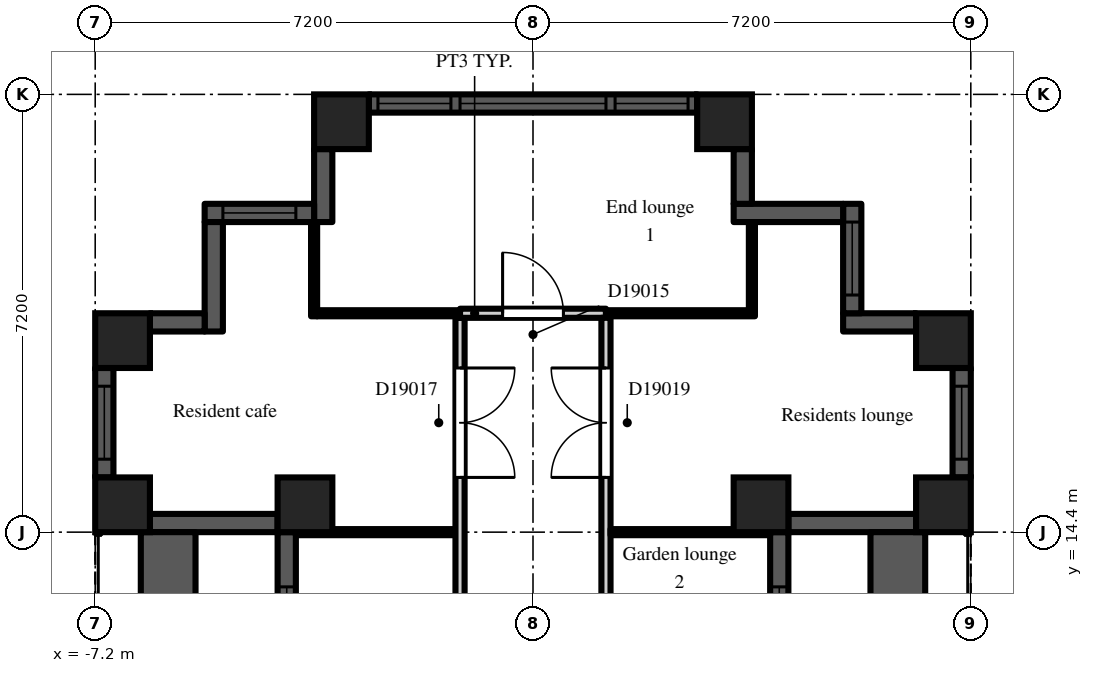
"""IFC4 building model, lengths in metres.
Left out: names, types, materials, properties, quantities, classifications, styles, units other than length and angle.
Written with IfcOpenShell. Run it as: python <this file> out.ifc"""

import sys

from ifc_helpers import new_model, si_unit, direction, frame, frame_2d, origin, origin_2d, place, context, subcontext, project, spatial, rectangle, extrude, element, fill, save


model = new_model("IFC4")
c1 = context("Model", 3, precision=1e-05, world=origin(), true_north=direction((0.0, 1.0)))
c2 = subcontext(c1, "Body", "Model", "MODEL_VIEW")
j1 = project(units=[si_unit("LENGTHUNIT", "METRE"), si_unit("PLANEANGLEUNIT", "RADIAN")], contexts=[c1])
p1 = place(None, origin())
s1 = spatial("IfcSite", under=j1, at=p1, CompositionType="ELEMENT")
p2 = place(p1, origin())
s2 = spatial("IfcBuilding", under=s1, at=p2, CompositionType="ELEMENT")
p3 = place(p2, frame((0.0, 0.0, 129.3)))
s3 = spatial("IfcBuildingStorey", under=s2, at=p3, CompositionType="ELEMENT", Elevation=129.3)
for number, where, z_axis, x_axis in (
    (1, (-6.75, 14.85, 0.0), (0.0, 0.0, 1.0), (1.0, 0.0, 0.0)),
    (2, (-6.75, 17.55, 0.0), (0.0, 0.0, 1.0), (1.0, 0.0, 0.0)),
    (3, (-3.75, 14.85, 0.0), (0.0, 0.0, 1.0), (1.0, 0.0, 0.0)),
    (4, (-3.15, 21.15, 0.0), (0.0, 0.0, 1.0), (1.0, 0.0, 0.0)),
    (5, (3.15, 21.15, 0.0), (0.0, 0.0, 1.0), (1.0, 0.0, 0.0)),
    (6, (3.75, 14.85, 0.0), (0.0, 0.0, 1.0), (1.0, 0.0, 0.0)),
    (7, (6.75, 14.85, 0.0), (0.0, 0.0, 1.0), (1.0, 0.0, 0.0)),
    (8, (6.75, 17.55, 0.0), (0.0, 0.0, 1.0), (1.0, 0.0, 0.0)),
):
    element("IfcColumn", number, at=place(p3, frame(where, z_axis=z_axis, x_axis=x_axis)), inside=s3, PredefinedType="COLUMN", context=c2, shape_type="SweptSolid", body=[
        extrude(rectangle(XDim=0.9, YDim=0.9, at=origin_2d()), origin(), (0.0, 0.0, 1.0), 3.0),
    ])
p4 = place(p3, frame((4.05, 7.2, 0.0), z_axis=(0.0, 0.0, 1.0), x_axis=(0.0, 1.0, 0.0)))
e9 = element("IfcWall", 9, at=p4, inside=s3, PredefinedType="SOLIDWALL", context=c2, shape_type="SweptSolid", body=[
    extrude(rectangle(XDim=7.2, YDim=0.3, at=frame_2d((3.6, 0.0))), origin(), (0.0, 0.0, 1.0), 2.2),
])
p5 = place(p4, frame((3.0, 0.0, 0.0)))
e10 = element("IfcOpeningElement", 10, at=p5, cuts=e9, PredefinedType="OPENING", context=c2, shape_type="SweptSolid", body=[
    extrude(rectangle(XDim=1.2, YDim=2.05, at=frame_2d((0.6, 1.025))), frame((0.0, 0.16, 0.0), z_axis=(0.0, -1.0, 0.0), x_axis=(1.0, 0.0, 0.0)), (0.0, 0.0, 1.0), 0.32),
])
p6 = place(p4, frame((0.9, 0.0, 0.2)))
e11 = element("IfcOpeningElement", 11, at=p6, cuts=e9, PredefinedType="OPENING", context=c2, shape_type="SweptSolid", body=[
    extrude(rectangle(XDim=1.8, YDim=1.85, at=frame_2d((0.9, 0.925))), frame((0.0, 0.16, 0.0), z_axis=(0.0, -1.0, 0.0), x_axis=(1.0, 0.0, 0.0)), (0.0, 0.0, 1.0), 0.32),
])
p7 = place(p4, frame((4.5, 0.0, 0.2)))
e12 = element("IfcOpeningElement", 12, at=p7, cuts=e9, PredefinedType="OPENING", context=c2, shape_type="SweptSolid", body=[
    extrude(rectangle(XDim=1.8, YDim=1.85, at=frame_2d((0.9, 0.925))), frame((0.0, 0.16, 0.0), z_axis=(0.0, -1.0, 0.0), x_axis=(1.0, 0.0, 0.0)), (0.0, 0.0, 1.0), 0.32),
])
p8 = place(p3, frame((4.2, 14.55, 0.0), z_axis=(0.0, 0.0, 1.0), x_axis=(1.0, 0.0, 0.0)))
e13 = element("IfcWall", 13, at=p8, inside=s3, PredefinedType="SOLIDWALL", context=c2, shape_type="SweptSolid", body=[
    extrude(rectangle(XDim=2.1, YDim=0.3, at=frame_2d((1.05, 0.0))), origin(), (0.0, 0.0, 1.0), 2.2),
])
p9 = place(p3, frame((7.05, 15.3, 0.0), z_axis=(0.0, 0.0, 1.0), x_axis=(0.0, 1.0, 0.0)))
e14 = element("IfcWall", 14, at=p9, inside=s3, PredefinedType="SOLIDWALL", context=c2, shape_type="SweptSolid", body=[
    extrude(rectangle(XDim=1.8, YDim=0.3, at=frame_2d((0.9, 0.0))), origin(), (0.0, 0.0, 1.0), 2.2),
])
p10 = place(p9, frame((0.3, 0.0, 0.2)))
e15 = element("IfcOpeningElement", 15, at=p10, cuts=e14, PredefinedType="OPENING", context=c2, shape_type="SweptSolid", body=[
    extrude(rectangle(XDim=1.2, YDim=1.85, at=frame_2d((0.6, 0.925))), frame((0.0, 0.16, 0.0), z_axis=(0.0, -1.0, 0.0), x_axis=(1.0, 0.0, 0.0)), (0.0, 0.0, 1.0), 0.32),
])
p11 = place(p3, frame((6.3, 17.85, 0.0), z_axis=(0.0, 0.0, 1.0), x_axis=(-1.0, 0.0, 0.0)))
e16 = element("IfcWall", 16, at=p11, inside=s3, PredefinedType="SOLIDWALL", context=c2, shape_type="SweptSolid", body=[
    extrude(rectangle(XDim=1.2, YDim=0.3, at=frame_2d((0.6, 0.0))), origin(), (0.0, 0.0, 1.0), 2.6),
])
p12 = place(p3, frame((5.25, 18.0, 0.0), z_axis=(0.0, 0.0, 1.0), x_axis=(0.0, 1.0, 0.0)))
e17 = element("IfcWall", 17, at=p12, inside=s3, PredefinedType="SOLIDWALL", context=c2, shape_type="SweptSolid", body=[
    extrude(rectangle(XDim=1.8, YDim=0.3, at=frame_2d((0.9, 0.0))), origin(), (0.0, 0.0, 1.0), 2.6),
])
p13 = place(p12, frame((0.3, 0.0, 0.2)))
e18 = element("IfcOpeningElement", 18, at=p13, cuts=e17, PredefinedType="OPENING", context=c2, shape_type="SweptSolid", body=[
    extrude(rectangle(XDim=1.2, YDim=1.85, at=frame_2d((0.6, 0.925))), frame((0.0, 0.16, 0.0), z_axis=(0.0, -1.0, 0.0), x_axis=(1.0, 0.0, 0.0)), (0.0, 0.0, 1.0), 0.32),
])
p14 = place(p3, frame((5.1, 19.65, 0.0), z_axis=(0.0, 0.0, 1.0), x_axis=(-1.0, 0.0, 0.0)))
e19 = element("IfcWall", 19, at=p14, inside=s3, PredefinedType="SOLIDWALL", context=c2, shape_type="SweptSolid", body=[
    extrude(rectangle(XDim=1.8, YDim=0.3, at=frame_2d((0.9, 0.0))), origin(), (0.0, 0.0, 1.0), 2.6),
])
p15 = place(p3, frame((3.45, 19.8, 0.0), z_axis=(0.0, 0.0, 1.0), x_axis=(0.0, 1.0, 0.0)))
e20 = element("IfcWall", 20, at=p15, inside=s3, PredefinedType="SOLIDWALL", context=c2, shape_type="SweptSolid", body=[
    extrude(rectangle(XDim=0.9, YDim=0.3, at=frame_2d((0.45, 0.0))), origin(), (0.0, 0.0, 1.0), 2.6),
])
p16 = place(p3, frame((2.7, 21.45, 0.0), z_axis=(0.0, 0.0, 1.0), x_axis=(-1.0, 0.0, 0.0)))
e21 = element("IfcWall", 21, at=p16, inside=s3, PredefinedType="SOLIDWALL", context=c2, shape_type="SweptSolid", body=[
    extrude(rectangle(XDim=5.4, YDim=0.3, at=frame_2d((2.7, 0.0))), origin(), (0.0, 0.0, 1.0), 2.2),
])
p17 = place(p16, frame((1.5, 0.0, 0.2)))
e22 = element("IfcOpeningElement", 22, at=p17, cuts=e21, PredefinedType="OPENING", context=c2, shape_type="SweptSolid", body=[
    extrude(rectangle(XDim=2.4, YDim=1.85, at=frame_2d((1.2, 0.925))), frame((0.0, 0.16, 0.0), z_axis=(0.0, -1.0, 0.0), x_axis=(1.0, 0.0, 0.0)), (0.0, 0.0, 1.0), 0.32),
])
p18 = place(p16, frame((0.15, 0.0, 0.2)))
e23 = element("IfcOpeningElement", 23, at=p18, cuts=e21, PredefinedType="OPENING", context=c2, shape_type="SweptSolid", body=[
    extrude(rectangle(XDim=1.2, YDim=1.85, at=frame_2d((0.6, 0.925))), frame((0.0, 0.16, 0.0), z_axis=(0.0, -1.0, 0.0), x_axis=(1.0, 0.0, 0.0)), (0.0, 0.0, 1.0), 0.32),
])
p19 = place(p16, frame((4.05, 0.0, 0.2)))
e24 = element("IfcOpeningElement", 24, at=p19, cuts=e21, PredefinedType="OPENING", context=c2, shape_type="SweptSolid", body=[
    extrude(rectangle(XDim=1.2, YDim=1.85, at=frame_2d((0.6, 0.925))), frame((0.0, 0.16, 0.0), z_axis=(0.0, -1.0, 0.0), x_axis=(1.0, 0.0, 0.0)), (0.0, 0.0, 1.0), 0.32),
])
p20 = place(p3, frame((-3.45, 20.7, 0.0), z_axis=(0.0, 0.0, 1.0), x_axis=(0.0, -1.0, 0.0)))
e25 = element("IfcWall", 25, at=p20, inside=s3, PredefinedType="SOLIDWALL", context=c2, shape_type="SweptSolid", body=[
    extrude(rectangle(XDim=1.2, YDim=0.3, at=frame_2d((0.6, 0.0))), origin(), (0.0, 0.0, 1.0), 2.6),
])
p21 = place(p3, frame((-3.6, 19.65, 0.0), z_axis=(0.0, 0.0, 1.0), x_axis=(-1.0, 0.0, 0.0)))
e26 = element("IfcWall", 26, at=p21, inside=s3, PredefinedType="SOLIDWALL", context=c2, shape_type="SweptSolid", body=[
    extrude(rectangle(XDim=1.8, YDim=0.3, at=frame_2d((0.9, 0.0))), origin(), (0.0, 0.0, 1.0), 2.6),
])
p22 = place(p21, frame((0.3, 0.0, 0.2)))
e27 = element("IfcOpeningElement", 27, at=p22, cuts=e26, PredefinedType="OPENING", context=c2, shape_type="SweptSolid", body=[
    extrude(rectangle(XDim=1.2, YDim=1.85, at=frame_2d((0.6, 0.925))), frame((0.0, 0.16, 0.0), z_axis=(0.0, -1.0, 0.0), x_axis=(1.0, 0.0, 0.0)), (0.0, 0.0, 1.0), 0.32),
])
p23 = place(p3, frame((-5.25, 19.5, 0.0), z_axis=(0.0, 0.0, 1.0), x_axis=(0.0, -1.0, 0.0)))
e28 = element("IfcWall", 28, at=p23, inside=s3, PredefinedType="SOLIDWALL", context=c2, shape_type="SweptSolid", body=[
    extrude(rectangle(XDim=1.8, YDim=0.3, at=frame_2d((0.9, 0.0))), origin(), (0.0, 0.0, 1.0), 2.6),
])
p24 = place(p3, frame((-5.4, 17.85, 0.0), z_axis=(0.0, 0.0, 1.0), x_axis=(-1.0, 0.0, 0.0)))
e29 = element("IfcWall", 29, at=p24, inside=s3, PredefinedType="SOLIDWALL", context=c2, shape_type="SweptSolid", body=[
    extrude(rectangle(XDim=0.9, YDim=0.3, at=frame_2d((0.45, 0.0))), origin(), (0.0, 0.0, 1.0), 2.6),
])
p25 = place(p3, frame((-7.05, 17.1, 0.0), z_axis=(0.0, 0.0, 1.0), x_axis=(0.0, -1.0, 0.0)))
e30 = element("IfcWall", 30, at=p25, inside=s3, PredefinedType="SOLIDWALL", context=c2, shape_type="SweptSolid", body=[
    extrude(rectangle(XDim=1.8, YDim=0.3, at=frame_2d((0.9, 0.0))), origin(), (0.0, 0.0, 1.0), 2.2),
])
p26 = place(p25, frame((0.3, 0.0, 0.2)))
e31 = element("IfcOpeningElement", 31, at=p26, cuts=e30, PredefinedType="OPENING", context=c2, shape_type="SweptSolid", body=[
    extrude(rectangle(XDim=1.2, YDim=1.85, at=frame_2d((0.6, 0.925))), frame((0.0, 0.16, 0.0), z_axis=(0.0, -1.0, 0.0), x_axis=(1.0, 0.0, 0.0)), (0.0, 0.0, 1.0), 0.32),
])
p27 = place(p3, frame((-6.3, 14.55, 0.0), z_axis=(0.0, 0.0, 1.0), x_axis=(1.0, 0.0, 0.0)))
e32 = element("IfcWall", 32, at=p27, inside=s3, PredefinedType="SOLIDWALL", context=c2, shape_type="SweptSolid", body=[
    extrude(rectangle(XDim=2.1, YDim=0.3, at=frame_2d((1.05, 0.0))), origin(), (0.0, 0.0, 1.0), 2.2),
])
p28 = place(p3, frame((-4.05, 14.4, 0.0), z_axis=(0.0, 0.0, 1.0), x_axis=(0.0, -1.0, 0.0)))
e33 = element("IfcWall", 33, at=p28, inside=s3, PredefinedType="SOLIDWALL", context=c2, shape_type="SweptSolid", body=[
    extrude(rectangle(XDim=7.2, YDim=0.3, at=frame_2d((3.6, 0.0))), origin(), (0.0, 0.0, 1.0), 2.2),
])
p29 = place(p28, frame((3.0, 0.0, 0.0)))
e34 = element("IfcOpeningElement", 34, at=p29, cuts=e33, PredefinedType="OPENING", context=c2, shape_type="SweptSolid", body=[
    extrude(rectangle(XDim=1.2, YDim=2.05, at=frame_2d((0.6, 1.025))), frame((0.0, 0.16, 0.0), z_axis=(0.0, -1.0, 0.0), x_axis=(1.0, 0.0, 0.0)), (0.0, 0.0, 1.0), 0.32),
])
p30 = place(p28, frame((0.9, 0.0, 0.2)))
e35 = element("IfcOpeningElement", 35, at=p30, cuts=e33, PredefinedType="OPENING", context=c2, shape_type="SweptSolid", body=[
    extrude(rectangle(XDim=1.8, YDim=1.85, at=frame_2d((0.9, 0.925))), frame((0.0, 0.16, 0.0), z_axis=(0.0, -1.0, 0.0), x_axis=(1.0, 0.0, 0.0)), (0.0, 0.0, 1.0), 0.32),
])
p31 = place(p28, frame((4.5, 0.0, 0.2)))
e36 = element("IfcOpeningElement", 36, at=p31, cuts=e33, PredefinedType="OPENING", context=c2, shape_type="SweptSolid", body=[
    extrude(rectangle(XDim=1.8, YDim=1.85, at=frame_2d((0.9, 0.925))), frame((0.0, 0.16, 0.0), z_axis=(0.0, -1.0, 0.0), x_axis=(1.0, 0.0, 0.0)), (0.0, 0.0, 1.0), 0.32),
])
for number, where, z_axis, x_axis in (
    (37, (6.0, 7.2, 0.0), (0.0, 0.0, 1.0), (0.0, 1.0, 0.0)),
    (38, (-6.0, 7.2, 0.0), (0.0, 0.0, 1.0), (0.0, 1.0, 0.0)),
):
    element("IfcWall", number, at=place(p3, frame(where, z_axis=z_axis, x_axis=x_axis)), inside=s3, PredefinedType="PARAPET", context=c2, shape_type="SweptSolid", body=[
        extrude(rectangle(XDim=7.2, YDim=0.9, at=frame_2d((3.6, 0.0))), origin(), (0.0, 0.0, 1.0), 0.8),
    ])
p32 = place(p3, frame((-3.9, 14.4, 0.0), z_axis=(0.0, 0.0, 1.0), x_axis=(1.0, 0.0, 0.0)))
e39 = element("IfcWall", 39, at=p32, inside=s3, PredefinedType="PARTITIONING", context=c2, shape_type="SweptSolid", body=[
    extrude(rectangle(XDim=2.625, YDim=0.1, at=frame_2d((1.312, 0.0))), origin(), (0.0, 0.0, 1.0), 2.6),
])
p33 = place(p3, frame((-3.6, 17.95, 0.0), z_axis=(0.0, 0.0, 1.0), x_axis=(0.0, 1.0, 0.0)))
e40 = element("IfcWall", 40, at=p33, inside=s3, PredefinedType="PARTITIONING", context=c2, shape_type="SweptSolid", body=[
    extrude(rectangle(XDim=1.55, YDim=0.1, at=frame_2d((0.775, 0.0))), origin(), (0.0, 0.0, 1.0), 2.6),
])
p34 = place(p3, frame((-3.55, 18.0, 0.0), z_axis=(0.0, 0.0, 1.0), x_axis=(1.0, 0.0, 0.0)))
e41 = element("IfcWall", 41, at=p34, inside=s3, PredefinedType="PARTITIONING", context=c2, shape_type="SweptSolid", body=[
    extrude(rectangle(XDim=2.35, YDim=0.1, at=frame_2d((1.175, 0.0))), origin(), (0.0, 0.0, 1.0), 2.6),
])
p35 = place(p3, frame((-1.2, 7.275, 0.0), z_axis=(0.0, 0.0, 1.0), x_axis=(0.0, 1.0, 0.0)))
e42 = element("IfcWall", 42, at=p35, inside=s3, PredefinedType="PARTITIONING", context=c2, shape_type="SweptSolid", body=[
    extrude(rectangle(XDim=10.65, YDim=0.15, at=frame_2d((5.325, 0.0))), origin(), (0.0, 0.0, 1.0), 2.6),
])
p36 = place(p35, frame((4.875, 0.0, 0.0)))
e43 = element("IfcOpeningElement", 43, at=p36, cuts=e42, PredefinedType="OPENING", context=c2, shape_type="SweptSolid", body=[
    extrude(rectangle(XDim=0.9, YDim=2.1, at=frame_2d((0.45, 1.05))), frame((0.0, 0.085, 0.0), z_axis=(0.0, -1.0, 0.0), x_axis=(1.0, 0.0, 0.0)), (0.0, 0.0, 1.0), 0.17),
])
p37 = place(p35, frame((8.025, 0.0, 0.0)))
e44 = element("IfcOpeningElement", 44, at=p37, cuts=e42, PredefinedType="OPENING", context=c2, shape_type="SweptSolid", body=[
    extrude(rectangle(XDim=1.8, YDim=2.1, at=frame_2d((0.9, 1.05))), frame((0.0, 0.085, 0.0), z_axis=(0.0, -1.0, 0.0), x_axis=(1.0, 0.0, 0.0)), (0.0, 0.0, 1.0), 0.17),
])
p38 = place(p3, frame((-1.2, 18.0, 0.0), z_axis=(0.0, 0.0, 1.0), x_axis=(1.0, 0.0, 0.0)))
e45 = element("IfcWall", 45, at=p38, inside=s3, PredefinedType="PARTITIONING", context=c2, shape_type="SweptSolid", body=[
    extrude(rectangle(XDim=2.4, YDim=0.15, at=frame_2d((1.2, 0.0))), origin(), (0.0, 0.0, 1.0), 2.6),
])
p39 = place(p38, frame((0.7, 0.0, 0.0)))
e46 = element("IfcOpeningElement", 46, at=p39, cuts=e45, PredefinedType="OPENING", context=c2, shape_type="SweptSolid", body=[
    extrude(rectangle(XDim=1.0, YDim=2.1, at=frame_2d((0.5, 1.05))), frame((0.0, 0.085, 0.0), z_axis=(0.0, -1.0, 0.0), x_axis=(1.0, 0.0, 0.0)), (0.0, 0.0, 1.0), 0.17),
])
p40 = place(p3, frame((1.2, 7.125, 0.0), z_axis=(0.0, 0.0, 1.0), x_axis=(0.0, 1.0, 0.0)))
e47 = element("IfcWall", 47, at=p40, inside=s3, PredefinedType="PARTITIONING", context=c2, shape_type="SweptSolid", body=[
    extrude(rectangle(XDim=10.8, YDim=0.15, at=frame_2d((5.4, 0.0))), origin(), (0.0, 0.0, 1.0), 2.6),
])
p41 = place(p40, frame((1.425, 0.0, 0.0)))
e48 = element("IfcOpeningElement", 48, at=p41, cuts=e47, PredefinedType="OPENING", context=c2, shape_type="SweptSolid", body=[
    extrude(rectangle(XDim=0.9, YDim=2.1, at=frame_2d((0.45, 1.05))), frame((0.0, 0.085, 0.0), z_axis=(0.0, -1.0, 0.0), x_axis=(1.0, 0.0, 0.0)), (0.0, 0.0, 1.0), 0.17),
])
p42 = place(p40, frame((8.175, 0.0, 0.0)))
e49 = element("IfcOpeningElement", 49, at=p42, cuts=e47, PredefinedType="OPENING", context=c2, shape_type="SweptSolid", body=[
    extrude(rectangle(XDim=1.8, YDim=2.1, at=frame_2d((0.9, 1.05))), frame((0.0, 0.085, 0.0), z_axis=(0.0, -1.0, 0.0), x_axis=(1.0, 0.0, 0.0)), (0.0, 0.0, 1.0), 0.17),
])
p43 = place(p3, frame((1.275, 14.4, 0.0), z_axis=(0.0, 0.0, 1.0), x_axis=(1.0, 0.0, 0.0)))
e50 = element("IfcWall", 50, at=p43, inside=s3, PredefinedType="PARTITIONING", context=c2, shape_type="SweptSolid", body=[
    extrude(rectangle(XDim=2.625, YDim=0.1, at=frame_2d((1.312, 0.0))), origin(), (0.0, 0.0, 1.0), 2.6),
])
p44 = place(p3, frame((1.2, 18.0, 0.0), z_axis=(0.0, 0.0, 1.0), x_axis=(1.0, 0.0, 0.0)))
e51 = element("IfcWall", 51, at=p44, inside=s3, PredefinedType="PARTITIONING", context=c2, shape_type="SweptSolid", body=[
    extrude(rectangle(XDim=2.45, YDim=0.1, at=frame_2d((1.225, 0.0))), origin(), (0.0, 0.0, 1.0), 2.6),
])
p45 = place(p3, frame((3.6, 18.05, 0.0), z_axis=(0.0, 0.0, 1.0), x_axis=(0.0, 1.0, 0.0)))
e52 = element("IfcWall", 52, at=p45, inside=s3, PredefinedType="PARTITIONING", context=c2, shape_type="SweptSolid", body=[
    extrude(rectangle(XDim=1.45, YDim=0.1, at=frame_2d((0.725, 0.0))), origin(), (0.0, 0.0, 1.0), 2.6),
])
p46 = place(p7, origin())
e53 = element("IfcWindow", 53, at=p46, inside=s3, PartitioningType="SINGLE_PANEL", PredefinedType="WINDOW", context=c2, shape_type="SweptSolid", body=[
    extrude(rectangle(XDim=1.8, YDim=1.85, at=frame_2d((0.9, 0.925))), frame((0.0, 0.03, 0.0), z_axis=(0.0, -1.0, 0.0), x_axis=(1.0, 0.0, 0.0)), (0.0, 0.0, 1.0), 0.06),
])
fill(e12, e53)
p47 = place(p10, origin())
e54 = element("IfcWindow", 54, at=p47, inside=s3, PartitioningType="SINGLE_PANEL", PredefinedType="WINDOW", context=c2, shape_type="SweptSolid", body=[
    extrude(rectangle(XDim=1.2, YDim=1.85, at=frame_2d((0.6, 0.925))), frame((0.0, 0.03, 0.0), z_axis=(0.0, -1.0, 0.0), x_axis=(1.0, 0.0, 0.0)), (0.0, 0.0, 1.0), 0.06),
])
fill(e15, e54)
p48 = place(p13, origin())
e55 = element("IfcWindow", 55, at=p48, inside=s3, PartitioningType="SINGLE_PANEL", PredefinedType="WINDOW", context=c2, shape_type="SweptSolid", body=[
    extrude(rectangle(XDim=1.2, YDim=1.85, at=frame_2d((0.6, 0.925))), frame((0.0, 0.03, 0.0), z_axis=(0.0, -1.0, 0.0), x_axis=(1.0, 0.0, 0.0)), (0.0, 0.0, 1.0), 0.06),
])
fill(e18, e55)
p49 = place(p17, origin())
e56 = element("IfcWindow", 56, at=p49, inside=s3, PartitioningType="SINGLE_PANEL", PredefinedType="WINDOW", context=c2, shape_type="SweptSolid", body=[
    extrude(rectangle(XDim=2.4, YDim=1.85, at=frame_2d((1.2, 0.925))), frame((0.0, 0.03, 0.0), z_axis=(0.0, -1.0, 0.0), x_axis=(1.0, 0.0, 0.0)), (0.0, 0.0, 1.0), 0.06),
])
fill(e22, e56)
p50 = place(p18, origin())
e57 = element("IfcWindow", 57, at=p50, inside=s3, PartitioningType="SINGLE_PANEL", PredefinedType="WINDOW", context=c2, shape_type="SweptSolid", body=[
    extrude(rectangle(XDim=1.2, YDim=1.85, at=frame_2d((0.6, 0.925))), frame((0.0, 0.03, 0.0), z_axis=(0.0, -1.0, 0.0), x_axis=(1.0, 0.0, 0.0)), (0.0, 0.0, 1.0), 0.06),
])
fill(e23, e57)
p51 = place(p19, origin())
e58 = element("IfcWindow", 58, at=p51, inside=s3, PartitioningType="SINGLE_PANEL", PredefinedType="WINDOW", context=c2, shape_type="SweptSolid", body=[
    extrude(rectangle(XDim=1.2, YDim=1.85, at=frame_2d((0.6, 0.925))), frame((0.0, 0.03, 0.0), z_axis=(0.0, -1.0, 0.0), x_axis=(1.0, 0.0, 0.0)), (0.0, 0.0, 1.0), 0.06),
])
fill(e24, e58)
p52 = place(p22, origin())
e59 = element("IfcWindow", 59, at=p52, inside=s3, PartitioningType="SINGLE_PANEL", PredefinedType="WINDOW", context=c2, shape_type="SweptSolid", body=[
    extrude(rectangle(XDim=1.2, YDim=1.85, at=frame_2d((0.6, 0.925))), frame((0.0, 0.03, 0.0), z_axis=(0.0, -1.0, 0.0), x_axis=(1.0, 0.0, 0.0)), (0.0, 0.0, 1.0), 0.06),
])
fill(e27, e59)
p53 = place(p26, origin())
e60 = element("IfcWindow", 60, at=p53, inside=s3, PartitioningType="SINGLE_PANEL", PredefinedType="WINDOW", context=c2, shape_type="SweptSolid", body=[
    extrude(rectangle(XDim=1.2, YDim=1.85, at=frame_2d((0.6, 0.925))), frame((0.0, 0.03, 0.0), z_axis=(0.0, -1.0, 0.0), x_axis=(1.0, 0.0, 0.0)), (0.0, 0.0, 1.0), 0.06),
])
fill(e31, e60)
p54 = place(p30, origin())
e61 = element("IfcWindow", 61, at=p54, inside=s3, PartitioningType="SINGLE_PANEL", PredefinedType="WINDOW", context=c2, shape_type="SweptSolid", body=[
    extrude(rectangle(XDim=1.8, YDim=1.85, at=frame_2d((0.9, 0.925))), frame((0.0, 0.03, 0.0), z_axis=(0.0, -1.0, 0.0), x_axis=(1.0, 0.0, 0.0)), (0.0, 0.0, 1.0), 0.06),
])
fill(e35, e61)
p55 = place(p39, origin())
e62 = element("IfcDoor", 62, at=p55, inside=s3, OperationType="SINGLE_SWING_LEFT", PredefinedType="DOOR", context=c2, shape_type="SweptSolid", body=[
    extrude(rectangle(XDim=1.0, YDim=2.1, at=frame_2d((0.5, 1.05))), frame((0.0, 0.025, 0.0), z_axis=(0.0, -1.0, 0.0), x_axis=(1.0, 0.0, 0.0)), (0.0, 0.0, 1.0), 0.05),
])
fill(e46, e62)
p56 = place(p37, frame((1.8, 0.0, 0.0), z_axis=(0.0, 0.0, 1.0), x_axis=(-1.0, 0.0, 0.0)))
e63 = element("IfcDoor", 63, at=p56, inside=s3, OperationType="DOUBLE_DOOR_DOUBLE_SWING", PredefinedType="DOOR", context=c2, shape_type="SweptSolid", body=[
    extrude(rectangle(XDim=1.8, YDim=2.1, at=frame_2d((0.9, 1.05))), frame((0.0, 0.025, 0.0), z_axis=(0.0, -1.0, 0.0), x_axis=(1.0, 0.0, 0.0)), (0.0, 0.0, 1.0), 0.05),
])
fill(e44, e63)
p57 = place(p42, origin())
e64 = element("IfcDoor", 64, at=p57, inside=s3, OperationType="DOUBLE_DOOR_DOUBLE_SWING", PredefinedType="DOOR", context=c2, shape_type="SweptSolid", body=[
    extrude(rectangle(XDim=1.8, YDim=2.1, at=frame_2d((0.9, 1.05))), frame((0.0, 0.025, 0.0), z_axis=(0.0, -1.0, 0.0), x_axis=(1.0, 0.0, 0.0)), (0.0, 0.0, 1.0), 0.05),
])
fill(e49, e64)
save(model, sys.argv[1])
